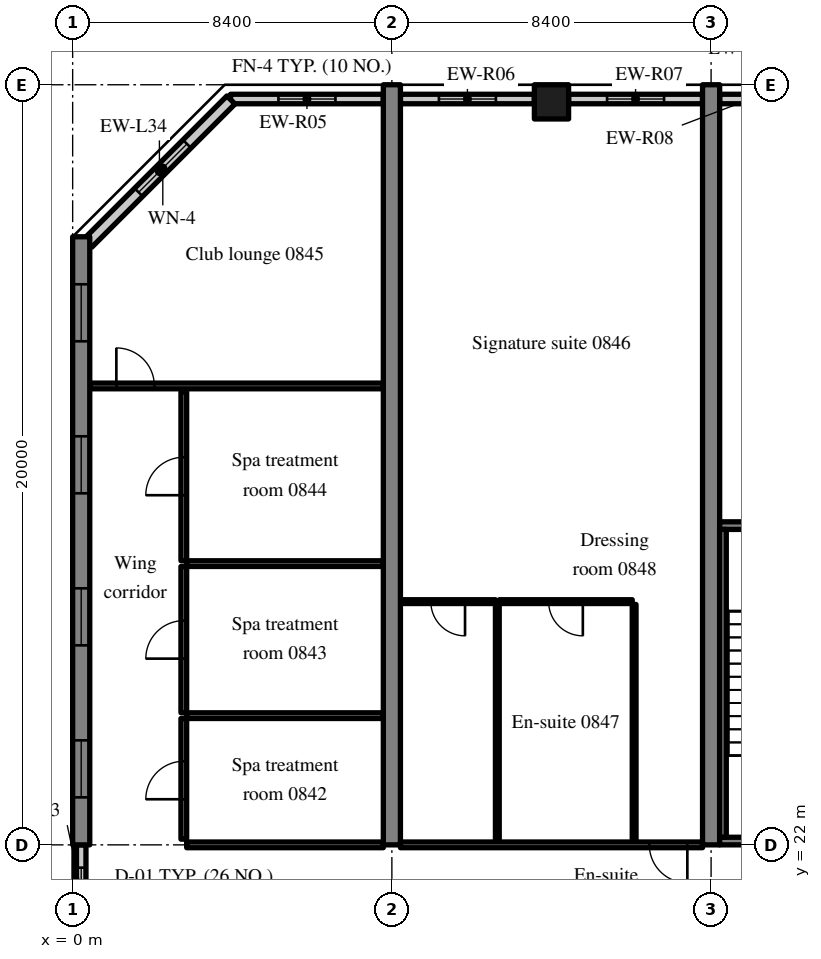
"""IFC4 building model, lengths in metres.
Left out: names, types, materials, properties, quantities, classifications, styles, units other than length and angle.
Written with IfcOpenShell. Run it as: python <this file> out.ifc"""

import sys

from ifc_helpers import new_model, si_unit, direction, frame, frame_2d, origin, origin_2d, place, context, subcontext, project, spatial, rectangle, extrude, source, transform, mapped, element, fill, save


model = new_model("IFC4")
c1 = context("Model", 3, precision=1e-05, world=origin(), true_north=direction((0.0, 1.0)))
c2 = subcontext(c1, "Body", "Model", "MODEL_VIEW")
j1 = project(units=[si_unit("LENGTHUNIT", "METRE"), si_unit("PLANEANGLEUNIT", "RADIAN")], contexts=[c1])
p1 = place(None, origin())
s1 = spatial("IfcSite", under=j1, at=p1, CompositionType="ELEMENT")
p2 = place(p1, origin())
s2 = spatial("IfcBuilding", under=s1, at=p2, CompositionType="ELEMENT")
p3 = place(p2, frame((0.0, 0.0, 39.2)))
s3 = spatial("IfcBuildingStorey", under=s2, at=p3, CompositionType="ELEMENT", Elevation=39.2)
m1 = source(origin(), c2, "Body", "SweptSolid", [
    extrude(rectangle(XDim=16.0, YDim=0.45, at=frame_2d((8.0, 0.0))), origin(), (0.0, 0.0, 1.0), 3.52),
])
p4 = place(p3, frame((0.225, 22.0, 0.0), z_axis=(0.0, 0.0, 1.0), x_axis=(0.0, 1.0, 0.0)))
e1 = element("IfcWall", 1, at=p4, inside=s3, PredefinedType="SHEAR", context=c2, shape_type="MappedRepresentation", body=[
    mapped(m1, transform((0.0, 0.0, 0.0), scale=1.0)),
])
m2 = source(origin(), c2, "Body", "SweptSolid", [
    extrude(rectangle(XDim=1.5, YDim=1.5, at=frame_2d((0.75, 0.75))), frame((0.0, 0.235, 0.0), z_axis=(0.0, -1.0, 0.0), x_axis=(1.0, 0.0, 0.0)), (0.0, 0.0, 1.0), 0.47),
])
p5 = place(p4, frame((1.25, 0.0, 0.9)))
e2 = element("IfcOpeningElement", 2, at=p5, cuts=e1, PredefinedType="OPENING", context=c2, shape_type="MappedRepresentation", body=[
    mapped(m2, transform((0.0, 0.0, 0.0), scale=1.0)),
])
p6 = place(p4, frame((5.25, 0.0, 0.9)))
e3 = element("IfcOpeningElement", 3, at=p6, cuts=e1, PredefinedType="OPENING", context=c2, shape_type="MappedRepresentation", body=[
    mapped(m2, transform((0.0, 0.0, 0.0), scale=1.0)),
])
p7 = place(p4, frame((9.25, 0.0, 0.9)))
e4 = element("IfcOpeningElement", 4, at=p7, cuts=e1, PredefinedType="OPENING", context=c2, shape_type="MappedRepresentation", body=[
    mapped(m2, transform((0.0, 0.0, 0.0), scale=1.0)),
])
p8 = place(p4, frame((13.25, 0.0, 0.9)))
e5 = element("IfcOpeningElement", 5, at=p8, cuts=e1, PredefinedType="OPENING", context=c2, shape_type="MappedRepresentation", body=[
    mapped(m2, transform((0.0, 0.0, 0.0), scale=1.0)),
])
m3 = source(origin(), c2, "Body", "SweptSolid", [
    extrude(rectangle(XDim=20.0, YDim=0.45, at=frame_2d((10.0, 0.0))), origin(), (0.0, 0.0, 1.0), 3.52),
])
for number, where, z_axis, x_axis in (
    (6, (8.4, 22.0, 0.0), (0.0, 0.0, 1.0), (0.0, 1.0, 0.0)),
    (7, (16.8, 22.0, 0.0), (0.0, 0.0, 1.0), (0.0, 1.0, 0.0)),
):
    element("IfcWall", number, at=place(p3, frame(where, z_axis=z_axis, x_axis=x_axis)), inside=s3, PredefinedType="SHEAR", context=c2, shape_type="MappedRepresentation", body=[
        mapped(m3, transform((0.0, 0.0, 0.0), scale=1.0)),
    ])
m4 = source(origin(), c2, "Body", "SweptSolid", [
    extrude(rectangle(XDim=0.9, YDim=0.9, at=origin_2d()), origin(), (0.0, 0.0, 1.0), 3.52),
])
p9 = place(p3, frame((12.6, 41.55, 0.0), z_axis=(0.0, 0.0, 1.0), x_axis=(1.0, 0.0, 0.0)))
e8 = element("IfcColumn", 8, at=p9, inside=s3, PredefinedType="COLUMN", context=c2, shape_type="MappedRepresentation", body=[
    mapped(m4, transform((0.0, 0.0, 0.0), scale=1.0)),
])
m5 = source(origin(), c2, "Body", "SweptSolid", [
    extrude(rectangle(XDim=4.02, YDim=0.25, at=frame_2d((2.01, 0.0))), origin(), (0.0, 0.0, 1.0), 2.77),
])
p10 = place(p3, frame((8.175, 41.625, 0.0), z_axis=(0.0, 0.0, 1.0), x_axis=(-1.0, 0.0, 0.0)))
e9 = element("IfcWall", 9, at=p10, inside=s3, PredefinedType="SOLIDWALL", context=c2, shape_type="MappedRepresentation", body=[
    mapped(m5, transform((0.0, 0.0, 0.0), scale=1.0)),
])
m6 = source(origin(), c2, "Body", "SweptSolid", [
    extrude(rectangle(XDim=1.5, YDim=1.5, at=frame_2d((0.75, 0.75))), frame((0.0, 0.135, 0.0), z_axis=(0.0, -1.0, 0.0), x_axis=(1.0, 0.0, 0.0)), (0.0, 0.0, 1.0), 0.27),
])
p11 = place(p10, frame((1.26, 0.0, 0.9)))
e10 = element("IfcOpeningElement", 10, at=p11, cuts=e9, PredefinedType="OPENING", context=c2, shape_type="MappedRepresentation", body=[
    mapped(m6, transform((0.0, 0.0, 0.0), scale=1.0)),
])
m7 = source(origin(), c2, "Body", "SweptSolid", [
    extrude(rectangle(XDim=3.525, YDim=0.25, at=frame_2d((1.762, 0.0))), origin(), (0.0, 0.0, 1.0), 2.77),
])
p12 = place(p3, frame((12.15, 41.625, 0.0), z_axis=(0.0, 0.0, 1.0), x_axis=(-1.0, 0.0, 0.0)))
e11 = element("IfcWall", 11, at=p12, inside=s3, PredefinedType="SOLIDWALL", context=c2, shape_type="MappedRepresentation", body=[
    mapped(m7, transform((0.0, 0.0, 0.0), scale=1.0)),
])
p13 = place(p12, frame((1.012, 0.0, 0.9)))
e12 = element("IfcOpeningElement", 12, at=p13, cuts=e11, PredefinedType="OPENING", context=c2, shape_type="MappedRepresentation", body=[
    mapped(m6, transform((0.0, 0.0, 0.0), scale=1.0)),
])
p14 = place(p3, frame((16.575, 41.625, 0.0), z_axis=(0.0, 0.0, 1.0), x_axis=(-1.0, 0.0, 0.0)))
e13 = element("IfcWall", 13, at=p14, inside=s3, PredefinedType="SOLIDWALL", context=c2, shape_type="MappedRepresentation", body=[
    mapped(m7, transform((0.0, 0.0, 0.0), scale=1.0)),
])
p15 = place(p14, frame((1.012, 0.0, 0.9)))
e14 = element("IfcOpeningElement", 14, at=p15, cuts=e13, PredefinedType="OPENING", context=c2, shape_type="MappedRepresentation", body=[
    mapped(m6, transform((0.0, 0.0, 0.0), scale=1.0)),
])
m8 = source(origin(), c2, "Body", "SweptSolid", [
    extrude(rectangle(XDim=1.633, YDim=0.25, at=frame_2d((0.816, 0.0))), origin(), (0.0, 0.0, 1.0), 2.77),
])
p16 = place(p3, frame((18.658, 41.625, 0.0), z_axis=(0.0, 0.0, 1.0), x_axis=(-1.0, 0.0, 0.0)))
e15 = element("IfcWall", 15, at=p16, inside=s3, PredefinedType="SOLIDWALL", context=c2, shape_type="MappedRepresentation", body=[
    mapped(m8, transform((0.0, 0.0, 0.0), scale=1.0)),
])
m9 = source(origin(), c2, "Body", "SweptSolid", [
    extrude(rectangle(XDim=5.326, YDim=0.3, at=frame_2d((2.663, 0.0))), origin(), (0.0, 0.0, 1.0), 3.52),
])
p17 = place(p3, frame((4.166, 41.6, 0.0), z_axis=(0.0, 0.0, 1.0), x_axis=(-0.707106781187, -0.707106781187, 0.0)))
e16 = element("IfcWall", 16, at=p17, inside=s3, PredefinedType="SOLIDWALL", context=c2, shape_type="MappedRepresentation", body=[
    mapped(m9, transform((0.0, 0.0, 0.0), scale=1.0)),
])
m10 = source(origin(), c2, "Body", "SweptSolid", [
    extrude(rectangle(XDim=1.8, YDim=1.5, at=frame_2d((0.9, 0.75))), frame((0.0, 0.16, 0.0), z_axis=(0.0, -1.0, 0.0), x_axis=(1.0, 0.0, 0.0)), (0.0, 0.0, 1.0), 0.32),
])
p18 = place(p17, frame((1.636, 0.0, 0.9)))
e17 = element("IfcOpeningElement", 17, at=p18, cuts=e16, PredefinedType="OPENING", context=c2, shape_type="MappedRepresentation", body=[
    mapped(m10, transform((0.0, 0.0, 0.0), scale=1.0)),
])
m11 = source(origin(), c2, "Body", "SweptSolid", [
    extrude(rectangle(XDim=2.4, YDim=0.25, at=frame_2d((1.2, 0.0))), origin(), (0.0, 0.0, 1.0), 2.62),
])
p19 = place(p3, frame((0.225, 19.6, 0.0), z_axis=(0.0, 0.0, 1.0), x_axis=(0.0, 1.0, 0.0)))
e18 = element("IfcWall", 18, at=p19, inside=s3, PredefinedType="SOLIDWALL", context=c2, shape_type="MappedRepresentation", body=[
    mapped(m11, transform((0.0, 0.0, 0.0), scale=1.0)),
])
m12 = source(origin(), c2, "Body", "SweptSolid", [
    extrude(rectangle(XDim=1.2, YDim=1.5, at=frame_2d((0.6, 0.75))), frame((0.0, 0.135, 0.0), z_axis=(0.0, -1.0, 0.0), x_axis=(1.0, 0.0, 0.0)), (0.0, 0.0, 1.0), 0.27),
])
p20 = place(p19, frame((0.6, 0.0, 0.9)))
e19 = element("IfcOpeningElement", 19, at=p20, cuts=e18, PredefinedType="OPENING", context=c2, shape_type="MappedRepresentation", body=[
    mapped(m12, transform((0.0, 0.0, 0.0), scale=1.0)),
])
m13 = source(origin(), c2, "Body", "SweptSolid", [
    extrude(rectangle(XDim=8.175, YDim=0.2, at=frame_2d((4.087, 0.0))), origin(), (0.0, 0.0, 1.0), 3.52),
])
p21 = place(p3, frame((17.025, 22.1, 0.0), z_axis=(0.0, 0.0, 1.0), x_axis=(1.0, 0.0, 0.0)))
e20 = element("IfcWall", 20, at=p21, inside=s3, PredefinedType="SOLIDWALL", context=c2, shape_type="MappedRepresentation", body=[
    mapped(m13, transform((0.0, 0.0, 0.0), scale=1.0)),
])
m14 = source(origin(), c2, "Body", "SweptSolid", [
    extrude(rectangle(XDim=1.2, YDim=2.1, at=frame_2d((0.6, 1.05))), frame((0.0, 0.11, 0.0), z_axis=(0.0, -1.0, 0.0), x_axis=(1.0, 0.0, 0.0)), (0.0, 0.0, 1.0), 0.22),
])
p22 = place(p21, frame((5.975, 0.0, 0.0)))
e21 = element("IfcOpeningElement", 21, at=p22, cuts=e20, PredefinedType="OPENING", context=c2, shape_type="MappedRepresentation", body=[
    mapped(m14, transform((0.0, 0.0, 0.0), scale=1.0)),
])
p23 = place(p3, frame((17.025, 30.4, 0.0), z_axis=(0.0, 0.0, 1.0), x_axis=(1.0, 0.0, 0.0)))
e22 = element("IfcWall", 22, at=p23, inside=s3, PredefinedType="SOLIDWALL", context=c2, shape_type="MappedRepresentation", body=[
    mapped(m13, transform((0.0, 0.0, 0.0), scale=1.0)),
])
m15 = source(origin(), c2, "Body", "SweptSolid", [
    extrude(rectangle(XDim=1.0, YDim=2.1, at=frame_2d((0.5, 1.05))), frame((0.0, 0.11, 0.0), z_axis=(0.0, -1.0, 0.0), x_axis=(1.0, 0.0, 0.0)), (0.0, 0.0, 1.0), 0.22),
])
p24 = place(p23, frame((6.075, 0.0, 0.0)))
e23 = element("IfcOpeningElement", 23, at=p24, cuts=e22, PredefinedType="OPENING", context=c2, shape_type="MappedRepresentation", body=[
    mapped(m15, transform((0.0, 0.0, 0.0), scale=1.0)),
])
m16 = source(origin(), c2, "Body", "SweptSolid", [
    extrude(rectangle(XDim=8.1, YDim=0.175, at=frame_2d((4.05, 0.0))), origin(), (0.0, 0.0, 1.0), 3.52),
])
p25 = place(p3, frame((17.112, 22.2, 0.0), z_axis=(0.0, 0.0, 1.0), x_axis=(0.0, 1.0, 0.0)))
e24 = element("IfcWall", 24, at=p25, inside=s3, PredefinedType="SOLIDWALL", context=c2, shape_type="MappedRepresentation", body=[
    mapped(m16, transform((0.0, 0.0, 0.0), scale=1.0)),
])
m17 = source(origin(), c2, "Body", "SweptSolid", [
    extrude(rectangle(XDim=5.175, YDim=0.15, at=frame_2d((2.587, 0.0))), origin(), (0.0, 0.0, 1.0), 2.82),
])
p26 = place(p3, frame((3.0, 22.0, 0.0), z_axis=(0.0, 0.0, 1.0), x_axis=(1.0, 0.0, 0.0)))
e25 = element("IfcWall", 25, at=p26, inside=s3, PredefinedType="PARTITIONING", context=c2, shape_type="MappedRepresentation", body=[
    mapped(m17, transform((0.0, 0.0, 0.0), scale=1.0)),
])
m18 = source(origin(), c2, "Body", "SweptSolid", [
    extrude(rectangle(XDim=3.175, YDim=0.15, at=frame_2d((1.587, 0.0))), origin(), (0.0, 0.0, 1.0), 3.52),
])
p27 = place(p3, frame((2.925, 22.15, 0.0), z_axis=(0.0, 0.0, 1.0), x_axis=(0.0, 1.0, 0.0)))
e26 = element("IfcWall", 26, at=p27, inside=s3, PredefinedType="PARTITIONING", context=c2, shape_type="MappedRepresentation", body=[
    mapped(m18, transform((0.0, 0.0, 0.0), scale=1.0)),
])
m19 = source(origin(), c2, "Body", "SweptSolid", [
    extrude(rectangle(XDim=1.0, YDim=2.1, at=frame_2d((0.5, 1.05))), frame((0.0, 0.085, 0.0), z_axis=(0.0, -1.0, 0.0), x_axis=(1.0, 0.0, 0.0)), (0.0, 0.0, 1.0), 0.17),
])
p28 = place(p27, frame((1.05, 0.0, 0.0)))
e27 = element("IfcOpeningElement", 27, at=p28, cuts=e26, PredefinedType="OPENING", context=c2, shape_type="MappedRepresentation", body=[
    mapped(m19, transform((0.0, 0.0, 0.0), scale=1.0)),
])
m20 = source(origin(), c2, "Body", "SweptSolid", [
    extrude(rectangle(XDim=5.175, YDim=0.15, at=frame_2d((2.587, 0.0))), origin(), (0.0, 0.0, 1.0), 3.52),
])
p29 = place(p3, frame((3.0, 25.4, 0.0), z_axis=(0.0, 0.0, 1.0), x_axis=(1.0, 0.0, 0.0)))
e28 = element("IfcWall", 28, at=p29, inside=s3, PredefinedType="PARTITIONING", context=c2, shape_type="MappedRepresentation", body=[
    mapped(m20, transform((0.0, 0.0, 0.0), scale=1.0)),
])
m21 = source(origin(), c2, "Body", "SweptSolid", [
    extrude(rectangle(XDim=3.85, YDim=0.15, at=frame_2d((1.925, 0.0))), origin(), (0.0, 0.0, 1.0), 3.52),
])
p30 = place(p3, frame((2.925, 25.475, 0.0), z_axis=(0.0, 0.0, 1.0), x_axis=(0.0, 1.0, 0.0)))
e29 = element("IfcWall", 29, at=p30, inside=s3, PredefinedType="PARTITIONING", context=c2, shape_type="MappedRepresentation", body=[
    mapped(m21, transform((0.0, 0.0, 0.0), scale=1.0)),
])
p31 = place(p30, frame((1.425, 0.0, 0.0)))
e30 = element("IfcOpeningElement", 30, at=p31, cuts=e29, PredefinedType="OPENING", context=c2, shape_type="MappedRepresentation", body=[
    mapped(m19, transform((0.0, 0.0, 0.0), scale=1.0)),
])
p32 = place(p3, frame((3.0, 29.4, 0.0), z_axis=(0.0, 0.0, 1.0), x_axis=(1.0, 0.0, 0.0)))
e31 = element("IfcWall", 31, at=p32, inside=s3, PredefinedType="PARTITIONING", context=c2, shape_type="MappedRepresentation", body=[
    mapped(m20, transform((0.0, 0.0, 0.0), scale=1.0)),
])
m22 = source(origin(), c2, "Body", "SweptSolid", [
    extrude(rectangle(XDim=4.45, YDim=0.15, at=frame_2d((2.225, 0.0))), origin(), (0.0, 0.0, 1.0), 3.52),
])
p33 = place(p3, frame((2.925, 29.475, 0.0), z_axis=(0.0, 0.0, 1.0), x_axis=(0.0, 1.0, 0.0)))
e32 = element("IfcWall", 32, at=p33, inside=s3, PredefinedType="PARTITIONING", context=c2, shape_type="MappedRepresentation", body=[
    mapped(m22, transform((0.0, 0.0, 0.0), scale=1.0)),
])
p34 = place(p33, frame((1.725, 0.0, 0.0)))
e33 = element("IfcOpeningElement", 33, at=p34, cuts=e32, PredefinedType="OPENING", context=c2, shape_type="MappedRepresentation", body=[
    mapped(m19, transform((0.0, 0.0, 0.0), scale=1.0)),
])
m23 = source(origin(), c2, "Body", "SweptSolid", [
    extrude(rectangle(XDim=7.725, YDim=0.15, at=frame_2d((3.863, 0.0))), origin(), (0.0, 0.0, 1.0), 3.52),
])
p35 = place(p3, frame((0.45, 34.075, 0.0), z_axis=(0.0, 0.0, 1.0), x_axis=(1.0, 0.0, 0.0)))
e34 = element("IfcWall", 34, at=p35, inside=s3, PredefinedType="PARTITIONING", context=c2, shape_type="MappedRepresentation", body=[
    mapped(m23, transform((0.0, 0.0, 0.0), scale=1.0)),
])
p36 = place(p35, frame((0.7, 0.0, 0.0)))
e35 = element("IfcOpeningElement", 35, at=p36, cuts=e34, PredefinedType="OPENING", context=c2, shape_type="MappedRepresentation", body=[
    mapped(m19, transform((0.0, 0.0, 0.0), scale=1.0)),
])
m24 = source(origin(), c2, "Body", "SweptSolid", [
    extrude(rectangle(XDim=6.25, YDim=0.1, at=frame_2d((3.125, 0.0))), origin(), (0.0, 0.0, 1.0), 3.52),
])
for number, where, z_axis, x_axis in (
    (36, (14.775, 22.075, 0.0), (0.0, 0.0, 1.0), (0.0, 1.0, 0.0)),
    (37, (11.175, 22.075, 0.0), (0.0, 0.0, 1.0), (0.0, 1.0, 0.0)),
):
    element("IfcWall", number, at=place(p3, frame(where, z_axis=z_axis, x_axis=x_axis)), inside=s3, PredefinedType="PARTITIONING", context=c2, shape_type="MappedRepresentation", body=[
        mapped(m24, transform((0.0, 0.0, 0.0), scale=1.0)),
    ])
m25 = source(origin(), c2, "Body", "SweptSolid", [
    extrude(rectangle(XDim=3.5, YDim=0.1, at=frame_2d((1.75, 0.0))), origin(), (0.0, 0.0, 1.0), 3.52),
])
p37 = place(p3, frame((11.225, 28.4, 0.0), z_axis=(0.0, 0.0, 1.0), x_axis=(1.0, 0.0, 0.0)))
e38 = element("IfcWall", 38, at=p37, inside=s3, PredefinedType="PARTITIONING", context=c2, shape_type="MappedRepresentation", body=[
    mapped(m25, transform((0.0, 0.0, 0.0), scale=1.0)),
])
m26 = source(origin(), c2, "Body", "SweptSolid", [
    extrude(rectangle(XDim=0.9, YDim=2.1, at=frame_2d((0.45, 1.05))), frame((0.0, 0.06, 0.0), z_axis=(0.0, -1.0, 0.0), x_axis=(1.0, 0.0, 0.0)), (0.0, 0.0, 1.0), 0.12),
])
p38 = place(p37, frame((1.3, 0.0, 0.0)))
e39 = element("IfcOpeningElement", 39, at=p38, cuts=e38, PredefinedType="OPENING", context=c2, shape_type="MappedRepresentation", body=[
    mapped(m26, transform((0.0, 0.0, 0.0), scale=1.0)),
])
m27 = source(origin(), c2, "Body", "SweptSolid", [
    extrude(rectangle(XDim=2.5, YDim=0.1, at=frame_2d((1.25, 0.0))), origin(), (0.0, 0.0, 1.0), 3.52),
])
p39 = place(p3, frame((8.625, 28.4, 0.0), z_axis=(0.0, 0.0, 1.0), x_axis=(1.0, 0.0, 0.0)))
e40 = element("IfcWall", 40, at=p39, inside=s3, PredefinedType="PARTITIONING", context=c2, shape_type="MappedRepresentation", body=[
    mapped(m27, transform((0.0, 0.0, 0.0), scale=1.0)),
])
p40 = place(p39, frame((0.8, 0.0, 0.0)))
e41 = element("IfcOpeningElement", 41, at=p40, cuts=e40, PredefinedType="OPENING", context=c2, shape_type="MappedRepresentation", body=[
    mapped(m26, transform((0.0, 0.0, 0.0), scale=1.0)),
])
m28 = source(origin(), c2, "Body", "SweptSolid", [
    extrude(rectangle(XDim=7.95, YDim=0.15, at=frame_2d((3.975, 0.0))), origin(), (0.0, 0.0, 1.0), 2.82),
])
p41 = place(p3, frame((8.625, 22.0, 0.0), z_axis=(0.0, 0.0, 1.0), x_axis=(1.0, 0.0, 0.0)))
e42 = element("IfcWall", 42, at=p41, inside=s3, PredefinedType="PARTITIONING", context=c2, shape_type="MappedRepresentation", body=[
    mapped(m28, transform((0.0, 0.0, 0.0), scale=1.0)),
])
p42 = place(p41, frame((6.55, 0.0, 0.0)))
e43 = element("IfcOpeningElement", 43, at=p42, cuts=e42, PredefinedType="OPENING", context=c2, shape_type="MappedRepresentation", body=[
    mapped(m19, transform((0.0, 0.0, 0.0), scale=1.0)),
])
m29 = source(origin(), c2, "Body", "SweptSolid", [
    extrude(rectangle(XDim=1.5, YDim=1.5, at=frame_2d((0.75, 0.75))), frame((0.0, 0.03, 0.0), z_axis=(0.0, -1.0, 0.0), x_axis=(1.0, 0.0, 0.0)), (0.0, 0.0, 1.0), 0.06),
])
p43 = place(p11, origin())
e44 = element("IfcWindow", 44, at=p43, inside=s3, PartitioningType="SINGLE_PANEL", PredefinedType="WINDOW", context=c2, shape_type="MappedRepresentation", body=[
    mapped(m29, transform((0.0, 0.0, 0.0), scale=1.0)),
])
fill(e10, e44)
p44 = place(p13, origin())
e45 = element("IfcWindow", 45, at=p44, inside=s3, PartitioningType="SINGLE_PANEL", PredefinedType="WINDOW", context=c2, shape_type="MappedRepresentation", body=[
    mapped(m29, transform((0.0, 0.0, 0.0), scale=1.0)),
])
fill(e12, e45)
p45 = place(p15, origin())
e46 = element("IfcWindow", 46, at=p45, inside=s3, PartitioningType="SINGLE_PANEL", PredefinedType="WINDOW", context=c2, shape_type="MappedRepresentation", body=[
    mapped(m29, transform((0.0, 0.0, 0.0), scale=1.0)),
])
fill(e14, e46)
m30 = source(origin(), c2, "Body", "SweptSolid", [
    extrude(rectangle(XDim=1.8, YDim=1.5, at=frame_2d((0.9, 0.75))), frame((0.0, 0.03, 0.0), z_axis=(0.0, -1.0, 0.0), x_axis=(1.0, 0.0, 0.0)), (0.0, 0.0, 1.0), 0.06),
])
p46 = place(p18, origin())
e47 = element("IfcWindow", 47, at=p46, inside=s3, PartitioningType="SINGLE_PANEL", PredefinedType="WINDOW", context=c2, shape_type="MappedRepresentation", body=[
    mapped(m30, transform((0.0, 0.0, 0.0), scale=1.0)),
])
fill(e17, e47)
p47 = place(p5, origin())
e48 = element("IfcWindow", 48, at=p47, inside=s3, PartitioningType="SINGLE_PANEL", PredefinedType="WINDOW", context=c2, shape_type="MappedRepresentation", body=[
    mapped(m29, transform((0.0, 0.0, 0.0), scale=1.0)),
])
fill(e2, e48)
p48 = place(p6, origin())
e49 = element("IfcWindow", 49, at=p48, inside=s3, PartitioningType="SINGLE_PANEL", PredefinedType="WINDOW", context=c2, shape_type="MappedRepresentation", body=[
    mapped(m29, transform((0.0, 0.0, 0.0), scale=1.0)),
])
fill(e3, e49)
p49 = place(p7, origin())
e50 = element("IfcWindow", 50, at=p49, inside=s3, PartitioningType="SINGLE_PANEL", PredefinedType="WINDOW", context=c2, shape_type="MappedRepresentation", body=[
    mapped(m29, transform((0.0, 0.0, 0.0), scale=1.0)),
])
fill(e4, e50)
p50 = place(p8, origin())
e51 = element("IfcWindow", 51, at=p50, inside=s3, PartitioningType="SINGLE_PANEL", PredefinedType="WINDOW", context=c2, shape_type="MappedRepresentation", body=[
    mapped(m29, transform((0.0, 0.0, 0.0), scale=1.0)),
])
fill(e5, e51)
m31 = source(origin(), c2, "Body", "SweptSolid", [
    extrude(rectangle(XDim=1.2, YDim=1.5, at=frame_2d((0.6, 0.75))), frame((0.0, 0.03, 0.0), z_axis=(0.0, -1.0, 0.0), x_axis=(1.0, 0.0, 0.0)), (0.0, 0.0, 1.0), 0.06),
])
p51 = place(p20, origin())
e52 = element("IfcWindow", 52, at=p51, inside=s3, PartitioningType="SINGLE_PANEL", PredefinedType="WINDOW", context=c2, shape_type="MappedRepresentation", body=[
    mapped(m31, transform((0.0, 0.0, 0.0), scale=1.0)),
])
fill(e19, e52)
m32 = source(origin(), c2, "Body", "SweptSolid", [
    extrude(rectangle(XDim=1.0, YDim=2.1, at=frame_2d((0.5, 1.05))), frame((0.0, 0.025, 0.0), z_axis=(0.0, -1.0, 0.0), x_axis=(1.0, 0.0, 0.0)), (0.0, 0.0, 1.0), 0.05),
])
p52 = place(p28, origin())
e53 = element("IfcDoor", 53, at=p52, inside=s3, OperationType="SINGLE_SWING_LEFT", PredefinedType="DOOR", context=c2, shape_type="MappedRepresentation", body=[
    mapped(m32, transform((0.0, 0.0, 0.0), scale=1.0)),
])
fill(e27, e53)
p53 = place(p31, origin())
e54 = element("IfcDoor", 54, at=p53, inside=s3, OperationType="SINGLE_SWING_LEFT", PredefinedType="DOOR", context=c2, shape_type="MappedRepresentation", body=[
    mapped(m32, transform((0.0, 0.0, 0.0), scale=1.0)),
])
fill(e30, e54)
p54 = place(p34, origin())
e55 = element("IfcDoor", 55, at=p54, inside=s3, OperationType="SINGLE_SWING_LEFT", PredefinedType="DOOR", context=c2, shape_type="MappedRepresentation", body=[
    mapped(m32, transform((0.0, 0.0, 0.0), scale=1.0)),
])
fill(e33, e55)
p55 = place(p36, origin())
e56 = element("IfcDoor", 56, at=p55, inside=s3, OperationType="SINGLE_SWING_LEFT", PredefinedType="DOOR", context=c2, shape_type="MappedRepresentation", body=[
    mapped(m32, transform((0.0, 0.0, 0.0), scale=1.0)),
])
fill(e35, e56)
m33 = source(origin(), c2, "Body", "SweptSolid", [
    extrude(rectangle(XDim=0.9, YDim=2.1, at=frame_2d((0.45, 1.05))), frame((0.0, 0.025, 0.0), z_axis=(0.0, -1.0, 0.0), x_axis=(1.0, 0.0, 0.0)), (0.0, 0.0, 1.0), 0.05),
])
p56 = place(p38, origin())
e57 = element("IfcDoor", 57, at=p56, inside=s3, OperationType="SINGLE_SWING_RIGHT", PredefinedType="DOOR", context=c2, shape_type="MappedRepresentation", body=[
    mapped(m33, transform((0.0, 0.0, 0.0), scale=1.0)),
])
fill(e39, e57)
p57 = place(p40, origin())
e58 = element("IfcDoor", 58, at=p57, inside=s3, OperationType="SINGLE_SWING_RIGHT", PredefinedType="DOOR", context=c2, shape_type="MappedRepresentation", body=[
    mapped(m33, transform((0.0, 0.0, 0.0), scale=1.0)),
])
fill(e41, e58)
p58 = place(p42, origin())
e59 = element("IfcDoor", 59, at=p58, inside=s3, OperationType="SINGLE_SWING_RIGHT", PredefinedType="DOOR", context=c2, shape_type="MappedRepresentation", body=[
    mapped(m32, transform((0.0, 0.0, 0.0), scale=1.0)),
])
fill(e43, e59)
save(model, sys.argv[1])
